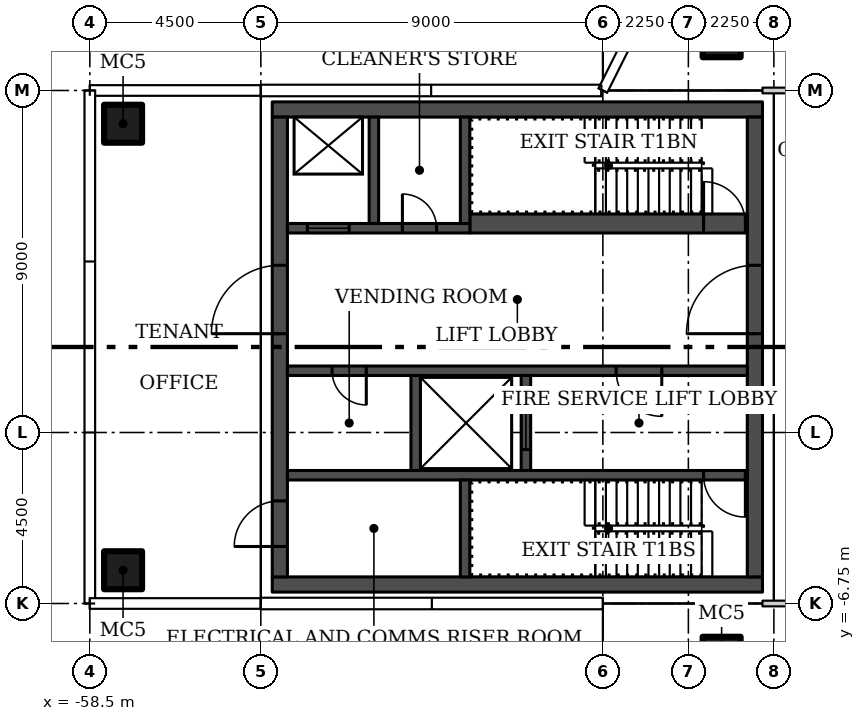
"""IFC4 building model, lengths in metres.
Left out: names, types, materials, properties, quantities, classifications, styles, units other than length and angle.
Written with IfcOpenShell. Run it as: python <this file> out.ifc"""

import sys

from ifc_helpers import new_model, si_unit, direction, frame, frame_2d, origin, origin_2d, place, context, subcontext, project, spatial, rectangle, hollow_rectangle, extrude, element, fill, save


model = new_model("IFC4")
c1 = context("Model", 3, precision=1e-05, world=origin(), true_north=direction((0.0, 1.0)))
c2 = subcontext(c1, "Body", "Model", "MODEL_VIEW")
j1 = project(units=[si_unit("LENGTHUNIT", "METRE"), si_unit("PLANEANGLEUNIT", "RADIAN")], contexts=[c1])
p1 = place(None, origin())
s1 = spatial("IfcSite", under=j1, at=p1, CompositionType="ELEMENT")
p2 = place(p1, origin())
s2 = spatial("IfcBuilding", under=s1, at=p2, CompositionType="ELEMENT")
p3 = place(p2, frame((0.0, 0.0, 221.7)))
s3 = spatial("IfcBuildingStorey", under=s2, at=p3, CompositionType="ELEMENT", Elevation=221.7)
for number, where in (
    (1, (-41.875, 8.125, 0.0)),
    (2, (-41.875, -8.125, 0.0)),
    (3, (-57.625, -5.875, 0.0)),
    (4, (-57.625, 5.875, 0.0)),
):
    element("IfcColumn", number, at=place(p3, frame(where)), inside=s3, PredefinedType="COLUMN", context=c2, shape_type="SweptSolid", body=[
        extrude(hollow_rectangle(XDim=1.0, YDim=1.0, WallThickness=0.04, at=origin_2d()), origin(), (0.0, 0.0, 1.0), 3.45),
    ])
p4 = place(p3, frame((-40.8, 6.75, 0.0)))
e5 = element("IfcWall", 5, at=p4, inside=s3, PredefinedType="PARTITIONING", context=c2, shape_type="SweptSolid", body=[
    extrude(rectangle(XDim=14.1, YDim=0.15, at=frame_2d((7.05, 0.0))), origin(), (0.0, 0.0, 1.0), 3.45),
])
p5 = place(p4, frame((6.3, 0.0, 0.0)))
e6 = element("IfcOpeningElement", 6, at=p5, cuts=e5, PredefinedType="OPENING", context=c2, shape_type="SweptSolid", body=[
    extrude(rectangle(XDim=1.5, YDim=2.1, at=frame_2d((0.75, 1.05))), frame((0.0, 0.085, 0.0), z_axis=(0.0, -1.0, 0.0), x_axis=(1.0, 0.0, 0.0)), (0.0, 0.0, 1.0), 0.17),
])
p6 = place(p3, frame((-26.7, -6.75, 0.0), z_axis=(0.0, 0.0, 1.0), x_axis=(-1.0, 0.0, 0.0)))
e7 = element("IfcWall", 7, at=p6, inside=s3, PredefinedType="PARTITIONING", context=c2, shape_type="SweptSolid", body=[
    extrude(rectangle(XDim=14.1, YDim=0.15, at=frame_2d((7.05, 0.0))), origin(), (0.0, 0.0, 1.0), 3.45),
])
p7 = place(p6, frame((6.3, 0.0, 0.0)))
e8 = element("IfcOpeningElement", 8, at=p7, cuts=e7, PredefinedType="OPENING", context=c2, shape_type="SweptSolid", body=[
    extrude(rectangle(XDim=1.5, YDim=2.1, at=frame_2d((0.75, 1.05))), frame((0.0, 0.085, 0.0), z_axis=(0.0, -1.0, 0.0), x_axis=(1.0, 0.0, 0.0)), (0.0, 0.0, 1.0), 0.17),
])
for number, where, z_axis, x_axis in (
    (9, (-40.8, -6.25, 0.0), (0.0, 0.0, 1.0), (-1.0, 0.0, 0.0)),
    (10, (-40.8, 6.25, 0.0), (0.0, 0.0, 1.0), (-1.0, 0.0, 0.0)),
):
    element("IfcWall", number, at=place(p3, frame(where, z_axis=z_axis, x_axis=x_axis)), inside=s3, PredefinedType="SHEAR", context=c2, shape_type="SweptSolid", body=[
        extrude(rectangle(XDim=12.9, YDim=0.4, at=frame_2d((6.45, 0.0))), origin(), (0.0, 0.0, 1.0), 3.45),
    ])
p8 = place(p3, frame((-41.0, -6.05, 0.0), z_axis=(0.0, 0.0, 1.0), x_axis=(0.0, 1.0, 0.0)))
e11 = element("IfcWall", 11, at=p8, inside=s3, PredefinedType="SHEAR", context=c2, shape_type="SweptSolid", body=[
    extrude(rectangle(XDim=12.1, YDim=0.4, at=frame_2d((6.05, 0.0))), origin(), (0.0, 0.0, 1.0), 3.45),
])
p9 = place(p8, frame((6.4, 0.0, 0.0)))
e12 = element("IfcOpeningElement", 12, at=p9, cuts=e11, PredefinedType="OPENING", context=c2, shape_type="SweptSolid", body=[
    extrude(rectangle(XDim=1.8, YDim=2.4, at=frame_2d((0.9, 1.2))), frame((0.0, 0.21, 0.0), z_axis=(0.0, -1.0, 0.0), x_axis=(1.0, 0.0, 0.0)), (0.0, 0.0, 1.0), 0.42),
])
p10 = place(p3, frame((-53.5, -6.05, 0.0), z_axis=(0.0, 0.0, 1.0), x_axis=(0.0, 1.0, 0.0)))
e13 = element("IfcWall", 13, at=p10, inside=s3, PredefinedType="SHEAR", context=c2, shape_type="SweptSolid", body=[
    extrude(rectangle(XDim=12.1, YDim=0.4, at=frame_2d((6.05, 0.0))), origin(), (0.0, 0.0, 1.0), 3.45),
])
p11 = place(p10, frame((0.8, 0.0, 0.0)))
e14 = element("IfcOpeningElement", 14, at=p11, cuts=e13, PredefinedType="OPENING", context=c2, shape_type="SweptSolid", body=[
    extrude(rectangle(XDim=1.2, YDim=2.1, at=frame_2d((0.6, 1.05))), frame((0.0, 0.21, 0.0), z_axis=(0.0, -1.0, 0.0), x_axis=(1.0, 0.0, 0.0)), (0.0, 0.0, 1.0), 0.42),
])
p12 = place(p10, frame((6.4, 0.0, 0.0)))
e15 = element("IfcOpeningElement", 15, at=p12, cuts=e13, PredefinedType="OPENING", context=c2, shape_type="SweptSolid", body=[
    extrude(rectangle(XDim=1.8, YDim=2.4, at=frame_2d((0.9, 1.2))), frame((0.0, 0.21, 0.0), z_axis=(0.0, -1.0, 0.0), x_axis=(1.0, 0.0, 0.0)), (0.0, 0.0, 1.0), 0.42),
])
p13 = place(p3, frame((-41.2, -3.375, 0.0), z_axis=(0.0, 0.0, 1.0), x_axis=(-1.0, 0.0, 0.0)))
e16 = element("IfcWall", 16, at=p13, inside=s3, PredefinedType="SHEAR", context=c2, shape_type="SweptSolid", body=[
    extrude(rectangle(XDim=12.1, YDim=0.25, at=frame_2d((6.05, 0.0))), origin(), (0.0, 0.0, 1.0), 3.45),
])
p14 = place(p13, frame((0.05, 0.0, 0.0)))
e17 = element("IfcOpeningElement", 17, at=p14, cuts=e16, PredefinedType="OPENING", context=c2, shape_type="SweptSolid", body=[
    extrude(rectangle(XDim=1.1, YDim=2.1, at=frame_2d((0.55, 1.05))), frame((0.0, 0.135, 0.0), z_axis=(0.0, -1.0, 0.0), x_axis=(1.0, 0.0, 0.0)), (0.0, 0.0, 1.0), 0.27),
])
p15 = place(p3, frame((-48.625, -6.05, 0.0), z_axis=(0.0, 0.0, 1.0), x_axis=(0.0, 1.0, 0.0)))
e18 = element("IfcWall", 18, at=p15, inside=s3, PredefinedType="SHEAR", context=c2, shape_type="SweptSolid", body=[
    extrude(rectangle(XDim=2.55, YDim=0.25, at=frame_2d((1.275, 0.0))), origin(), (0.0, 0.0, 1.0), 3.45),
])
p16 = place(p3, frame((-41.2, -0.625, 0.0), z_axis=(0.0, 0.0, 1.0), x_axis=(-1.0, 0.0, 0.0)))
e19 = element("IfcWall", 19, at=p16, inside=s3, PredefinedType="SHEAR", context=c2, shape_type="SweptSolid", body=[
    extrude(rectangle(XDim=12.1, YDim=0.25, at=frame_2d((6.05, 0.0))), origin(), (0.0, 0.0, 1.0), 3.45),
])
p17 = place(p16, frame((2.25, 0.0, 0.0)))
e20 = element("IfcOpeningElement", 20, at=p17, cuts=e19, PredefinedType="OPENING", context=c2, shape_type="SweptSolid", body=[
    extrude(rectangle(XDim=1.2, YDim=2.1, at=frame_2d((0.6, 1.05))), frame((0.0, 0.135, 0.0), z_axis=(0.0, -1.0, 0.0), x_axis=(1.0, 0.0, 0.0)), (0.0, 0.0, 1.0), 0.27),
])
p18 = place(p16, frame((10.025, 0.0, 0.0)))
e21 = element("IfcOpeningElement", 21, at=p18, cuts=e19, PredefinedType="OPENING", context=c2, shape_type="SweptSolid", body=[
    extrude(rectangle(XDim=0.9, YDim=2.1, at=frame_2d((0.45, 1.05))), frame((0.0, 0.135, 0.0), z_axis=(0.0, -1.0, 0.0), x_axis=(1.0, 0.0, 0.0)), (0.0, 0.0, 1.0), 0.27),
])
p19 = place(p3, frame((-47.025, -3.25, 0.0), z_axis=(0.0, 0.0, 1.0), x_axis=(0.0, 1.0, 0.0)))
e22 = element("IfcWall", 22, at=p19, inside=s3, PredefinedType="SHEAR", context=c2, shape_type="SweptSolid", body=[
    extrude(rectangle(XDim=2.5, YDim=0.25, at=frame_2d((1.25, 0.0))), origin(), (0.0, 0.0, 1.0), 3.45),
])
p20 = place(p19, frame((0.55, 0.0, 0.0)))
e23 = element("IfcOpeningElement", 23, at=p20, cuts=e22, PredefinedType="OPENING", context=c2, shape_type="SweptSolid", body=[
    extrude(rectangle(XDim=1.4, YDim=2.4, at=frame_2d((0.7, 1.2))), frame((0.0, 0.135, 0.0), z_axis=(0.0, -1.0, 0.0), x_axis=(1.0, 0.0, 0.0)), (0.0, 0.0, 1.0), 0.27),
])
p21 = place(p3, frame((-49.925, -3.25, 0.0), z_axis=(0.0, 0.0, 1.0), x_axis=(0.0, 1.0, 0.0)))
e24 = element("IfcWall", 24, at=p21, inside=s3, PredefinedType="SHEAR", context=c2, shape_type="SweptSolid", body=[
    extrude(rectangle(XDim=2.5, YDim=0.25, at=frame_2d((1.25, 0.0))), origin(), (0.0, 0.0, 1.0), 3.45),
])
p22 = place(p3, frame((-48.5, 3.25, 0.0)))
e25 = element("IfcWall", 25, at=p22, inside=s3, PredefinedType="SHEAR", context=c2, shape_type="SweptSolid", body=[
    extrude(rectangle(XDim=7.3, YDim=0.5, at=frame_2d((3.65, 0.0))), origin(), (0.0, 0.0, 1.0), 3.45),
])
p23 = place(p22, frame((6.15, 0.0, 0.0)))
e26 = element("IfcOpeningElement", 26, at=p23, cuts=e25, PredefinedType="OPENING", context=c2, shape_type="SweptSolid", body=[
    extrude(rectangle(XDim=1.1, YDim=2.1, at=frame_2d((0.55, 1.05))), frame((0.0, 0.26, 0.0), z_axis=(0.0, -1.0, 0.0), x_axis=(1.0, 0.0, 0.0)), (0.0, 0.0, 1.0), 0.52),
])
p24 = place(p3, frame((-53.3, 3.125, 0.0)))
e27 = element("IfcWall", 27, at=p24, inside=s3, PredefinedType="SHEAR", context=c2, shape_type="SweptSolid", body=[
    extrude(rectangle(XDim=4.8, YDim=0.25, at=frame_2d((2.4, 0.0))), origin(), (0.0, 0.0, 1.0), 3.45),
])
p25 = place(p24, frame((0.525, 0.0, 0.0)))
e28 = element("IfcOpeningElement", 28, at=p25, cuts=e27, PredefinedType="OPENING", context=c2, shape_type="SweptSolid", body=[
    extrude(rectangle(XDim=1.1, YDim=2.1, at=frame_2d((0.55, 1.05))), frame((0.0, 0.135, 0.0), z_axis=(0.0, -1.0, 0.0), x_axis=(1.0, 0.0, 0.0)), (0.0, 0.0, 1.0), 0.27),
])
p26 = place(p24, frame((3.025, 0.0, 0.0)))
e29 = element("IfcOpeningElement", 29, at=p26, cuts=e27, PredefinedType="OPENING", context=c2, shape_type="SweptSolid", body=[
    extrude(rectangle(XDim=0.9, YDim=2.1, at=frame_2d((0.45, 1.05))), frame((0.0, 0.135, 0.0), z_axis=(0.0, -1.0, 0.0), x_axis=(1.0, 0.0, 0.0)), (0.0, 0.0, 1.0), 0.27),
])
for number, where, z_axis, x_axis in (
    (30, (-48.625, 3.25, 0.0), (0.0, 0.0, 1.0), (0.0, 1.0, 0.0)),
    (31, (-51.025, 3.25, 0.0), (0.0, 0.0, 1.0), (0.0, 1.0, 0.0)),
):
    element("IfcWall", number, at=place(p3, frame(where, z_axis=z_axis, x_axis=x_axis)), inside=s3, PredefinedType="SHEAR", context=c2, shape_type="SweptSolid", body=[
        extrude(rectangle(XDim=2.8, YDim=0.25, at=frame_2d((1.4, 0.0))), origin(), (0.0, 0.0, 1.0), 3.45),
    ])
p27 = place(p9, origin())
e32 = element("IfcDoor", 32, at=p27, inside=s3, OperationType="DOUBLE_DOOR_SINGLE_SWING", PredefinedType="DOOR", context=c2, shape_type="SweptSolid", body=[
    extrude(rectangle(XDim=1.8, YDim=2.4, at=frame_2d((0.9, 1.2))), frame((0.0, 0.025, 0.0), z_axis=(0.0, -1.0, 0.0), x_axis=(1.0, 0.0, 0.0)), (0.0, 0.0, 1.0), 0.05),
])
fill(e12, e32)
p28 = place(p11, origin())
e33 = element("IfcDoor", 33, at=p28, inside=s3, OperationType="SINGLE_SWING_LEFT", PredefinedType="DOOR", context=c2, shape_type="SweptSolid", body=[
    extrude(rectangle(XDim=1.2, YDim=2.1, at=frame_2d((0.6, 1.05))), frame((0.0, 0.025, 0.0), z_axis=(0.0, -1.0, 0.0), x_axis=(1.0, 0.0, 0.0)), (0.0, 0.0, 1.0), 0.05),
])
fill(e14, e33)
p29 = place(p12, origin())
e34 = element("IfcDoor", 34, at=p29, inside=s3, OperationType="DOUBLE_DOOR_SINGLE_SWING", PredefinedType="DOOR", context=c2, shape_type="SweptSolid", body=[
    extrude(rectangle(XDim=1.8, YDim=2.4, at=frame_2d((0.9, 1.2))), frame((0.0, 0.025, 0.0), z_axis=(0.0, -1.0, 0.0), x_axis=(1.0, 0.0, 0.0)), (0.0, 0.0, 1.0), 0.05),
])
fill(e15, e34)
p30 = place(p14, origin())
e35 = element("IfcDoor", 35, at=p30, inside=s3, OperationType="SINGLE_SWING_LEFT", PredefinedType="DOOR", context=c2, shape_type="SweptSolid", body=[
    extrude(rectangle(XDim=1.1, YDim=2.1, at=frame_2d((0.55, 1.05))), frame((0.0, 0.025, 0.0), z_axis=(0.0, -1.0, 0.0), x_axis=(1.0, 0.0, 0.0)), (0.0, 0.0, 1.0), 0.05),
])
fill(e17, e35)
p31 = place(p17, origin())
e36 = element("IfcDoor", 36, at=p31, inside=s3, OperationType="SINGLE_SWING_LEFT", PredefinedType="DOOR", context=c2, shape_type="SweptSolid", body=[
    extrude(rectangle(XDim=1.2, YDim=2.1, at=frame_2d((0.6, 1.05))), frame((0.0, 0.025, 0.0), z_axis=(0.0, -1.0, 0.0), x_axis=(1.0, 0.0, 0.0)), (0.0, 0.0, 1.0), 0.05),
])
fill(e20, e36)
p32 = place(p18, origin())
e37 = element("IfcDoor", 37, at=p32, inside=s3, OperationType="SINGLE_SWING_RIGHT", PredefinedType="DOOR", context=c2, shape_type="SweptSolid", body=[
    extrude(rectangle(XDim=0.9, YDim=2.1, at=frame_2d((0.45, 1.05))), frame((0.0, 0.025, 0.0), z_axis=(0.0, -1.0, 0.0), x_axis=(1.0, 0.0, 0.0)), (0.0, 0.0, 1.0), 0.05),
])
fill(e21, e37)
p33 = place(p20, origin())
e38 = element("IfcDoor", 38, at=p33, inside=s3, OperationType="SLIDING_TO_LEFT", PredefinedType="DOOR", context=c2, shape_type="SweptSolid", body=[
    extrude(rectangle(XDim=1.4, YDim=2.4, at=frame_2d((0.7, 1.2))), frame((0.0, 0.025, 0.0), z_axis=(0.0, -1.0, 0.0), x_axis=(1.0, 0.0, 0.0)), (0.0, 0.0, 1.0), 0.05),
])
fill(e23, e38)
p34 = place(p23, origin())
e39 = element("IfcDoor", 39, at=p34, inside=s3, OperationType="SINGLE_SWING_RIGHT", PredefinedType="DOOR", context=c2, shape_type="SweptSolid", body=[
    extrude(rectangle(XDim=1.1, YDim=2.1, at=frame_2d((0.55, 1.05))), frame((0.0, 0.025, 0.0), z_axis=(0.0, -1.0, 0.0), x_axis=(1.0, 0.0, 0.0)), (0.0, 0.0, 1.0), 0.05),
])
fill(e26, e39)
p35 = place(p25, origin())
e40 = element("IfcDoor", 40, at=p35, inside=s3, OperationType="SLIDING_TO_LEFT", PredefinedType="DOOR", context=c2, shape_type="SweptSolid", body=[
    extrude(rectangle(XDim=1.1, YDim=2.1, at=frame_2d((0.55, 1.05))), frame((0.0, 0.025, 0.0), z_axis=(0.0, -1.0, 0.0), x_axis=(1.0, 0.0, 0.0)), (0.0, 0.0, 1.0), 0.05),
])
fill(e28, e40)
p36 = place(p26, origin())
e41 = element("IfcDoor", 41, at=p36, inside=s3, OperationType="SINGLE_SWING_RIGHT", PredefinedType="DOOR", context=c2, shape_type="SweptSolid", body=[
    extrude(rectangle(XDim=0.9, YDim=2.1, at=frame_2d((0.45, 1.05))), frame((0.0, 0.025, 0.0), z_axis=(0.0, -1.0, 0.0), x_axis=(1.0, 0.0, 0.0)), (0.0, 0.0, 1.0), 0.05),
])
fill(e29, e41)
save(model, sys.argv[1])
